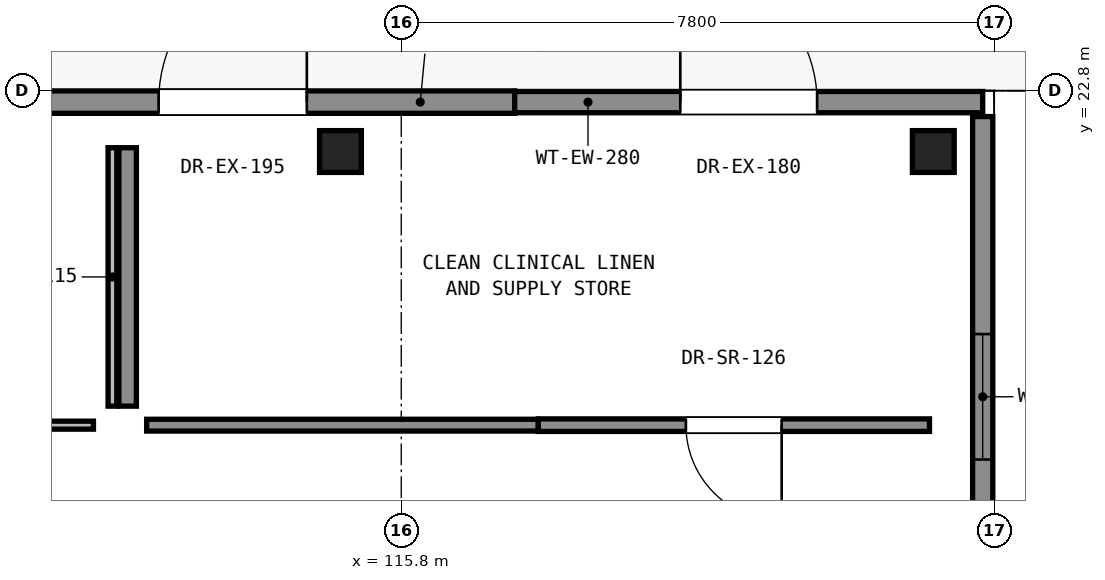
"""IFC4 building model, lengths in metres.
Left out: names, types, materials, properties, quantities, classifications, styles, units other than length and angle.
Written with IfcOpenShell. Run it as: python <this file> out.ifc"""

import sys

from ifc_helpers import new_model, si_unit, direction, frame, frame_2d, origin, origin_2d, place, context, subcontext, project, spatial, rectangle, extrude, element, fill, save


model = new_model("IFC4")
c1 = context("Model", 3, precision=1e-05, world=origin(), true_north=direction((0.0, 1.0)))
c2 = subcontext(c1, "Body", "Model", "MODEL_VIEW")
j1 = project(units=[si_unit("LENGTHUNIT", "METRE"), si_unit("PLANEANGLEUNIT", "RADIAN")], contexts=[c1])
p1 = place(None, origin())
s1 = spatial("IfcSite", under=j1, at=p1, CompositionType="ELEMENT")
p2 = place(p1, origin())
s2 = spatial("IfcBuilding", under=s1, at=p2, CompositionType="ELEMENT")
p3 = place(p2, origin())
s3 = spatial("IfcBuildingStorey", under=s2, at=p3, CompositionType="ELEMENT", Elevation=0.0)
for number, where, z_axis, x_axis in (
    (1, (115.0, 22.0, 0.0), (0.0, 0.0, 1.0), (1.0, 0.0, 0.0)),
    (2, (122.8, 22.0, 0.0), (0.0, 0.0, 1.0), (1.0, 0.0, 0.0)),
):
    element("IfcColumn", number, at=place(p3, frame(where, z_axis=z_axis, x_axis=x_axis)), inside=s3, PredefinedType="COLUMN", context=c2, shape_type="SweptSolid", body=[
        extrude(rectangle(XDim=0.55, YDim=0.55, at=origin_2d()), origin(), (0.0, 0.0, 1.0), 5.1),
    ])
p4 = place(p3, frame((111.135, 22.65, 0.0), z_axis=(0.0, 0.0, 1.0), x_axis=(1.0, 0.0, 0.0)))
e3 = element("IfcWall", 3, at=p4, inside=s3, PredefinedType="SOLIDWALL", context=c2, shape_type="SweptSolid", body=[
    extrude(rectangle(XDim=6.158, YDim=0.295, at=frame_2d((3.079, 0.0))), origin(), (0.0, 0.0, 1.0), 4.77),
])
p5 = place(p4, frame((1.473, 0.0, 0.0)))
e4 = element("IfcOpeningElement", 4, at=p5, cuts=e3, PredefinedType="OPENING", context=c2, shape_type="SweptSolid", body=[
    extrude(rectangle(XDim=1.95, YDim=2.4, at=frame_2d((0.975, 1.2))), frame((0.0, 0.157, 0.0), z_axis=(0.0, -1.0, 0.0), x_axis=(1.0, 0.0, 0.0)), (0.0, 0.0, 1.0), 0.315),
])
p6 = place(p3, frame((117.292, 22.65, 0.0), z_axis=(0.0, 0.0, 1.0), x_axis=(1.0, 0.0, 0.0)))
e5 = element("IfcWall", 5, at=p6, inside=s3, PredefinedType="SOLIDWALL", context=c2, shape_type="SweptSolid", body=[
    extrude(rectangle(XDim=6.158, YDim=0.28, at=frame_2d((3.079, 0.0))), origin(), (0.0, 0.0, 1.0), 4.77),
])
p7 = place(p6, frame((2.179, 0.0, 0.0)))
e6 = element("IfcOpeningElement", 6, at=p7, cuts=e5, PredefinedType="OPENING", context=c2, shape_type="SweptSolid", body=[
    extrude(rectangle(XDim=1.8, YDim=2.35, at=frame_2d((0.9, 1.175))), frame((0.0, 0.15, 0.0), z_axis=(0.0, -1.0, 0.0), x_axis=(1.0, 0.0, 0.0)), (0.0, 0.0, 1.0), 0.3),
])
p8 = place(p3, frame((123.45, 22.46, 0.0), z_axis=(0.0, 0.0, 1.0), x_axis=(0.0, -1.0, 0.0)))
e7 = element("IfcWall", 7, at=p8, inside=s3, PredefinedType="SOLIDWALL", context=c2, shape_type="SweptSolid", body=[
    extrude(rectangle(XDim=7.373, YDim=0.265, at=frame_2d((3.687, 0.0))), origin(), (0.0, 0.0, 1.0), 4.77),
])
p9 = place(p8, frame((2.862, 0.0, 0.9)))
e8 = element("IfcOpeningElement", 8, at=p9, cuts=e7, PredefinedType="OPENING", context=c2, shape_type="SweptSolid", body=[
    extrude(rectangle(XDim=1.65, YDim=1.5, at=frame_2d((0.825, 0.75))), frame((0.0, 0.142, 0.0), z_axis=(0.0, -1.0, 0.0), x_axis=(1.0, 0.0, 0.0)), (0.0, 0.0, 1.0), 0.285),
])
p10 = place(p3, frame((112.0, 22.05, 0.0), z_axis=(0.0, 0.0, 1.0), x_axis=(0.0, -1.0, 0.0)))
e9 = element("IfcWall", 9, at=p10, inside=s3, PredefinedType="PARTITIONING", context=c2, shape_type="SweptSolid", body=[
    extrude(rectangle(XDim=3.4, YDim=0.115, at=frame_2d((1.7, 0.0))), origin(), (0.0, 0.0, 1.0), 4.07),
])
p11 = place(p3, frame((111.75, 18.4, 0.0), z_axis=(0.0, 0.0, 1.0), x_axis=(-1.0, 0.0, 0.0)))
e10 = element("IfcWall", 10, at=p11, inside=s3, PredefinedType="PARTITIONING", context=c2, shape_type="SweptSolid", body=[
    extrude(rectangle(XDim=9.3, YDim=0.105, at=frame_2d((4.65, 0.0))), origin(), (0.0, 0.0, 1.0), 4.07),
])
p12 = place(p11, frame((4.175, 0.0, 0.0)))
e11 = element("IfcOpeningElement", 11, at=p12, cuts=e10, PredefinedType="OPENING", context=c2, shape_type="SweptSolid", body=[
    extrude(rectangle(XDim=0.95, YDim=2.15, at=frame_2d((0.475, 1.075))), frame((0.0, 0.062, 0.0), z_axis=(0.0, -1.0, 0.0), x_axis=(1.0, 0.0, 0.0)), (0.0, 0.0, 1.0), 0.125),
])
p13 = place(p3, frame((122.75, 18.4, 0.0), z_axis=(0.0, 0.0, 1.0), x_axis=(-1.0, 0.0, 0.0)))
e12 = element("IfcWall", 12, at=p13, inside=s3, PredefinedType="PARTITIONING", context=c2, shape_type="SweptSolid", body=[
    extrude(rectangle(XDim=5.15, YDim=0.165, at=frame_2d((2.575, 0.0))), origin(), (0.0, 0.0, 1.0), 4.07),
])
p14 = place(p13, frame((1.945, 0.0, 0.0)))
e13 = element("IfcOpeningElement", 13, at=p14, cuts=e12, PredefinedType="OPENING", context=c2, shape_type="SweptSolid", body=[
    extrude(rectangle(XDim=1.26, YDim=2.15, at=frame_2d((0.63, 1.075))), frame((0.0, 0.093, 0.0), z_axis=(0.0, -1.0, 0.0), x_axis=(1.0, 0.0, 0.0)), (0.0, 0.0, 1.0), 0.185),
])
p15 = place(p3, frame((117.6, 18.4, 0.0), z_axis=(0.0, 0.0, 1.0), x_axis=(-1.0, 0.0, 0.0)))
e14 = element("IfcWall", 14, at=p15, inside=s3, PredefinedType="PARTITIONING", context=c2, shape_type="SweptSolid", body=[
    extrude(rectangle(XDim=5.15, YDim=0.155, at=frame_2d((2.575, 0.0))), origin(), (0.0, 0.0, 1.0), 4.22),
])
p16 = place(p3, frame((112.2, 18.65, 0.0), z_axis=(0.0, 0.0, 1.0), x_axis=(0.0, 1.0, 0.0)))
e15 = element("IfcWall", 15, at=p16, inside=s3, PredefinedType="PARTITIONING", context=c2, shape_type="SweptSolid", body=[
    extrude(rectangle(XDim=3.4, YDim=0.23, at=frame_2d((1.7, 0.0))), origin(), (0.0, 0.0, 1.0), 4.07),
])
p17 = place(p5, origin())
e16 = element("IfcDoor", 16, at=p17, inside=s3, OperationType="SINGLE_SWING_RIGHT", PredefinedType="DOOR", context=c2, shape_type="SweptSolid", body=[
    extrude(rectangle(XDim=1.95, YDim=2.4, at=frame_2d((0.975, 1.2))), frame((0.0, 0.025, 0.0), z_axis=(0.0, -1.0, 0.0), x_axis=(1.0, 0.0, 0.0)), (0.0, 0.0, 1.0), 0.05),
])
fill(e4, e16)
p18 = place(p7, origin())
e17 = element("IfcDoor", 17, at=p18, inside=s3, OperationType="SINGLE_SWING_LEFT", PredefinedType="DOOR", context=c2, shape_type="SweptSolid", body=[
    extrude(rectangle(XDim=1.8, YDim=2.35, at=frame_2d((0.9, 1.175))), frame((0.0, 0.025, 0.0), z_axis=(0.0, -1.0, 0.0), x_axis=(1.0, 0.0, 0.0)), (0.0, 0.0, 1.0), 0.05),
])
fill(e6, e17)
p19 = place(p9, origin())
e18 = element("IfcWindow", 18, at=p19, inside=s3, PartitioningType="SINGLE_PANEL", PredefinedType="WINDOW", context=c2, shape_type="SweptSolid", body=[
    extrude(rectangle(XDim=1.65, YDim=1.5, at=frame_2d((0.825, 0.75))), frame((0.0, 0.03, 0.0), z_axis=(0.0, -1.0, 0.0), x_axis=(1.0, 0.0, 0.0)), (0.0, 0.0, 1.0), 0.06),
])
fill(e8, e18)
p20 = place(p14, origin())
e19 = element("IfcDoor", 19, at=p20, inside=s3, OperationType="SINGLE_SWING_LEFT", PredefinedType="DOOR", context=c2, shape_type="SweptSolid", body=[
    extrude(rectangle(XDim=1.26, YDim=2.15, at=frame_2d((0.63, 1.075))), frame((0.0, 0.025, 0.0), z_axis=(0.0, -1.0, 0.0), x_axis=(1.0, 0.0, 0.0)), (0.0, 0.0, 1.0), 0.05),
])
fill(e13, e19)
save(model, sys.argv[1])
